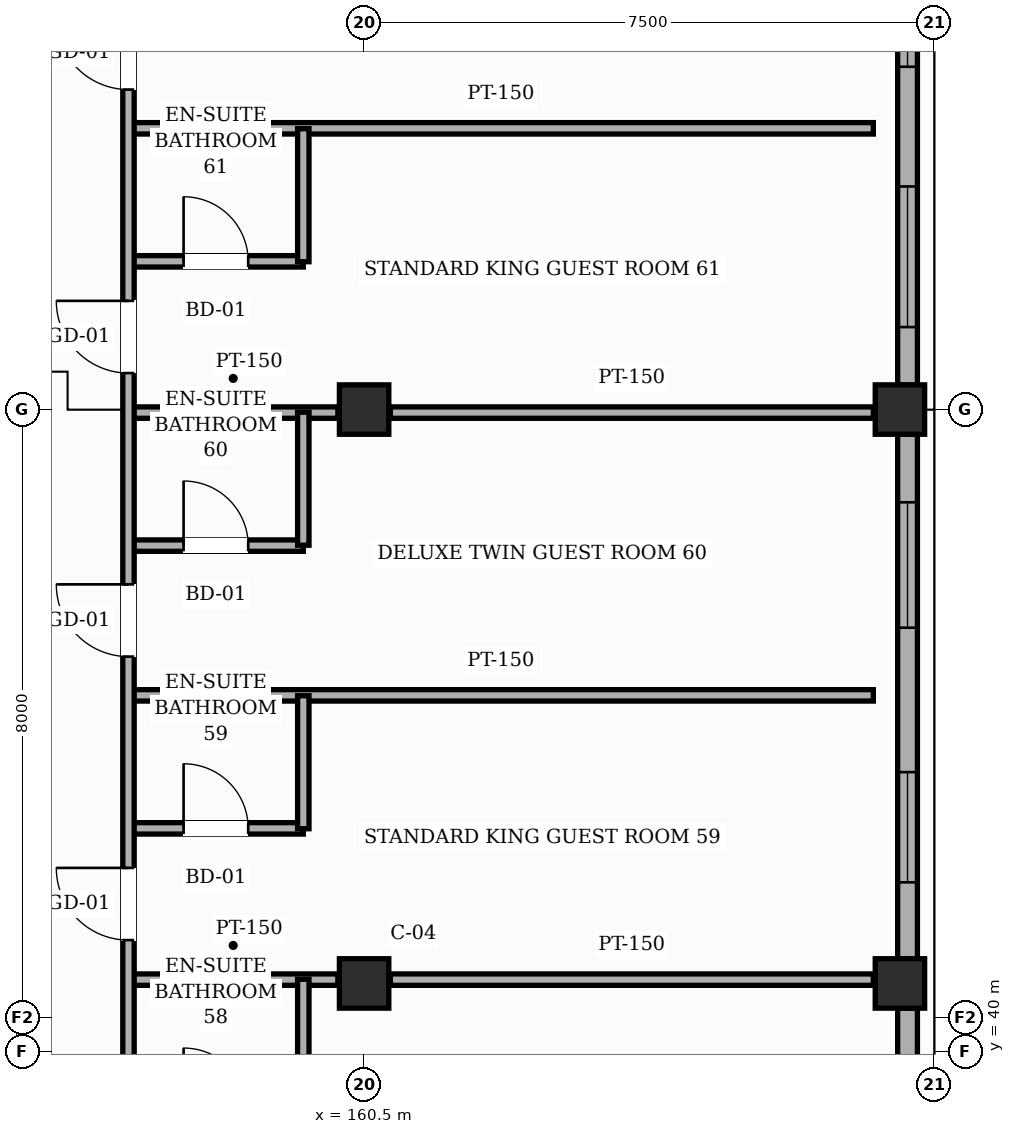
"""IFC4 building model, lengths in metres.
Left out: names, types, materials, properties, quantities, classifications, styles, units other than length and angle.
Written with IfcOpenShell. Run it as: python <this file> out.ifc"""

import sys

from ifc_helpers import new_model, si_unit, direction, frame, frame_2d, origin, origin_2d, place, context, subcontext, project, spatial, rectangle, hollow_rectangle, extrude, element, fill, save


model = new_model("IFC4")
c1 = context("Model", 3, precision=1e-05, world=origin(), true_north=direction((0.0, 1.0)))
c2 = subcontext(c1, "Body", "Model", "MODEL_VIEW")
j1 = project(units=[si_unit("LENGTHUNIT", "METRE"), si_unit("PLANEANGLEUNIT", "RADIAN")], contexts=[c1])
p1 = place(None, origin())
s1 = spatial("IfcSite", under=j1, at=p1, CompositionType="ELEMENT")
p2 = place(p1, origin())
s2 = spatial("IfcBuilding", under=s1, at=p2, CompositionType="ELEMENT")
p3 = place(p2, frame((0.0, 0.0, 19.8)))
s3 = spatial("IfcBuildingStorey", under=s2, at=p3, CompositionType="ELEMENT", Elevation=19.8)
for number, where, z_axis, x_axis in (
    (1, (160.5, 40.9, 0.0), (0.0, 0.0, 1.0), (1.0, 0.0, 0.0)),
    (2, (160.5, 48.45, 0.0), (0.0, 0.0, 1.0), (1.0, 0.0, 0.0)),
    (3, (167.55, 40.9, 0.0), (0.0, 0.0, 1.0), (1.0, 0.0, 0.0)),
    (4, (167.55, 48.45, 0.0), (0.0, 0.0, 1.0), (1.0, 0.0, 0.0)),
):
    element("IfcColumn", number, at=place(p3, frame(where, z_axis=z_axis, x_axis=x_axis)), inside=s3, PredefinedType="COLUMN", context=c2, shape_type="SweptSolid", body=[
        extrude(hollow_rectangle(XDim=0.65, YDim=0.65, WallThickness=0.025, InnerFilletRadius=0.025, OuterFilletRadius=0.05, at=origin_2d()), origin(), (0.0, 0.0, 1.0), 4.8),
    ])
p4 = place(p3, frame((167.65, 40.575, 0.0), z_axis=(0.0, 0.0, 1.0), x_axis=(0.0, -1.0, 0.0)))
e5 = element("IfcWall", 5, at=p4, inside=s3, PredefinedType="SOLIDWALL", context=c2, shape_type="SweptSolid", body=[
    extrude(rectangle(XDim=8.25, YDim=0.26, at=frame_2d((4.125, 0.0))), origin(), (0.0, 0.0, 1.0), 3.905),
])
p5 = place(p4, frame((4.095, 0.0, 0.85)))
e6 = element("IfcOpeningElement", 6, at=p5, cuts=e5, PredefinedType="OPENING", context=c2, shape_type="SweptSolid", body=[
    extrude(rectangle(XDim=2.25, YDim=1.8, at=frame_2d((1.125, 0.9))), frame((0.0, 0.14, 0.0), z_axis=(0.0, -1.0, 0.0), x_axis=(1.0, 0.0, 0.0)), (0.0, 0.0, 1.0), 0.28),
])
p6 = place(p4, frame((1.05, 0.0, 0.85)))
e7 = element("IfcOpeningElement", 7, at=p6, cuts=e5, PredefinedType="OPENING", context=c2, shape_type="SweptSolid", body=[
    extrude(rectangle(XDim=1.25, YDim=1.95, at=frame_2d((0.625, 0.975))), frame((0.0, 0.14, 0.0), z_axis=(0.0, -1.0, 0.0), x_axis=(1.0, 0.0, 0.0)), (0.0, 0.0, 1.0), 0.28),
])
p7 = place(p3, frame((167.65, 48.125, 0.0), z_axis=(0.0, 0.0, 1.0), x_axis=(0.0, -1.0, 0.0)))
e8 = element("IfcWall", 8, at=p7, inside=s3, PredefinedType="SOLIDWALL", context=c2, shape_type="SweptSolid", body=[
    extrude(rectangle(XDim=6.9, YDim=0.26, at=frame_2d((3.45, 0.0))), origin(), (0.0, 0.0, 1.0), 3.905),
])
p8 = place(p7, frame((4.445, 0.0, 0.85)))
e9 = element("IfcOpeningElement", 9, at=p8, cuts=e8, PredefinedType="OPENING", context=c2, shape_type="SweptSolid", body=[
    extrude(rectangle(XDim=1.45, YDim=1.95, at=frame_2d((0.725, 0.975))), frame((0.0, 0.14, 0.0), z_axis=(0.0, -1.0, 0.0), x_axis=(1.0, 0.0, 0.0)), (0.0, 0.0, 1.0), 0.28),
])
p9 = place(p7, frame((0.895, 0.0, 0.85)))
e10 = element("IfcOpeningElement", 10, at=p9, cuts=e8, PredefinedType="OPENING", context=c2, shape_type="SweptSolid", body=[
    extrude(rectangle(XDim=1.65, YDim=1.95, at=frame_2d((0.825, 0.975))), frame((0.0, 0.14, 0.0), z_axis=(0.0, -1.0, 0.0), x_axis=(1.0, 0.0, 0.0)), (0.0, 0.0, 1.0), 0.28),
])
p10 = place(p3, frame((167.65, 56.125, 0.0), z_axis=(0.0, 0.0, 1.0), x_axis=(0.0, -1.0, 0.0)))
e11 = element("IfcWall", 11, at=p10, inside=s3, PredefinedType="SOLIDWALL", context=c2, shape_type="SweptSolid", body=[
    extrude(rectangle(XDim=7.35, YDim=0.26, at=frame_2d((3.675, 0.0))), origin(), (0.0, 0.0, 1.0), 3.905),
])
p11 = place(p10, frame((4.74, 0.0, 0.85)))
e12 = element("IfcOpeningElement", 12, at=p11, cuts=e11, PredefinedType="OPENING", context=c2, shape_type="SweptSolid", body=[
    extrude(rectangle(XDim=1.85, YDim=1.95, at=frame_2d((0.925, 0.975))), frame((0.0, 0.14, 0.0), z_axis=(0.0, -1.0, 0.0), x_axis=(1.0, 0.0, 0.0)), (0.0, 0.0, 1.0), 0.28),
])
p12 = place(p10, frame((1.065, 0.0, 0.85)))
e13 = element("IfcOpeningElement", 13, at=p12, cuts=e11, PredefinedType="OPENING", context=c2, shape_type="SweptSolid", body=[
    extrude(rectangle(XDim=2.1, YDim=1.95, at=frame_2d((1.05, 0.975))), frame((0.0, 0.14, 0.0), z_axis=(0.0, -1.0, 0.0), x_axis=(1.0, 0.0, 0.0)), (0.0, 0.0, 1.0), 0.28),
])
p13 = place(p3, frame((157.4, 40.95, 0.0), z_axis=(0.0, 0.0, 1.0), x_axis=(1.0, 0.0, 0.0)))
e14 = element("IfcWall", 14, at=p13, inside=s3, PredefinedType="PARTITIONING", context=c2, shape_type="SweptSolid", body=[
    extrude(rectangle(XDim=2.755, YDim=0.15, at=frame_2d((1.377, 0.0))), origin(), (0.0, 0.0, 1.0), 3.905),
])
p14 = place(p3, frame((160.845, 40.95, 0.0), z_axis=(0.0, 0.0, 1.0), x_axis=(1.0, 0.0, 0.0)))
e15 = element("IfcWall", 15, at=p14, inside=s3, PredefinedType="PARTITIONING", context=c2, shape_type="SweptSolid", body=[
    extrude(rectangle(XDim=6.355, YDim=0.15, at=frame_2d((3.177, 0.0))), origin(), (0.0, 0.0, 1.0), 3.905),
])
p15 = place(p3, frame((157.4, 42.94, 0.0), z_axis=(0.0, 0.0, 1.0), x_axis=(1.0, 0.0, 0.0)))
e16 = element("IfcWall", 16, at=p15, inside=s3, PredefinedType="PARTITIONING", context=c2, shape_type="SweptSolid", body=[
    extrude(rectangle(XDim=2.3, YDim=0.15, at=frame_2d((1.15, 0.0))), origin(), (0.0, 0.0, 1.0), 4.565),
])
p16 = place(p15, frame((0.725, 0.0, 0.0)))
e17 = element("IfcOpeningElement", 17, at=p16, cuts=e16, PredefinedType="OPENING", context=c2, shape_type="SweptSolid", body=[
    extrude(rectangle(XDim=0.85, YDim=2.1, at=frame_2d((0.425, 1.05))), frame((0.0, 0.085, 0.0), z_axis=(0.0, -1.0, 0.0), x_axis=(1.0, 0.0, 0.0)), (0.0, 0.0, 1.0), 0.17),
])
p17 = place(p3, frame((157.4, 44.69, 0.0), z_axis=(0.0, 0.0, 1.0), x_axis=(1.0, 0.0, 0.0)))
e18 = element("IfcWall", 18, at=p17, inside=s3, PredefinedType="PARTITIONING", context=c2, shape_type="SweptSolid", body=[
    extrude(rectangle(XDim=9.8, YDim=0.15, at=frame_2d((4.9, 0.0))), origin(), (0.0, 0.0, 1.0), 4.255),
])
p18 = place(p3, frame((157.4, 46.66, 0.0), z_axis=(0.0, 0.0, 1.0), x_axis=(1.0, 0.0, 0.0)))
e19 = element("IfcWall", 19, at=p18, inside=s3, PredefinedType="PARTITIONING", context=c2, shape_type="SweptSolid", body=[
    extrude(rectangle(XDim=2.3, YDim=0.15, at=frame_2d((1.15, 0.0))), origin(), (0.0, 0.0, 1.0), 4.565),
])
p19 = place(p18, frame((0.725, 0.0, 0.0)))
e20 = element("IfcOpeningElement", 20, at=p19, cuts=e19, PredefinedType="OPENING", context=c2, shape_type="SweptSolid", body=[
    extrude(rectangle(XDim=0.85, YDim=2.1, at=frame_2d((0.425, 1.05))), frame((0.0, 0.085, 0.0), z_axis=(0.0, -1.0, 0.0), x_axis=(1.0, 0.0, 0.0)), (0.0, 0.0, 1.0), 0.17),
])
p20 = place(p3, frame((157.4, 48.41, 0.0), z_axis=(0.0, 0.0, 1.0), x_axis=(1.0, 0.0, 0.0)))
e21 = element("IfcWall", 21, at=p20, inside=s3, PredefinedType="PARTITIONING", context=c2, shape_type="SweptSolid", body=[
    extrude(rectangle(XDim=2.755, YDim=0.15, at=frame_2d((1.377, 0.0))), origin(), (0.0, 0.0, 1.0), 4.565),
])
p21 = place(p3, frame((160.845, 48.41, 0.0), z_axis=(0.0, 0.0, 1.0), x_axis=(1.0, 0.0, 0.0)))
e22 = element("IfcWall", 22, at=p21, inside=s3, PredefinedType="PARTITIONING", context=c2, shape_type="SweptSolid", body=[
    extrude(rectangle(XDim=6.355, YDim=0.15, at=frame_2d((3.177, 0.0))), origin(), (0.0, 0.0, 1.0), 3.955),
])
p22 = place(p3, frame((157.4, 50.4, 0.0), z_axis=(0.0, 0.0, 1.0), x_axis=(1.0, 0.0, 0.0)))
e23 = element("IfcWall", 23, at=p22, inside=s3, PredefinedType="PARTITIONING", context=c2, shape_type="SweptSolid", body=[
    extrude(rectangle(XDim=2.3, YDim=0.15, at=frame_2d((1.15, 0.0))), origin(), (0.0, 0.0, 1.0), 4.565),
])
p23 = place(p22, frame((0.725, 0.0, 0.0)))
e24 = element("IfcOpeningElement", 24, at=p23, cuts=e23, PredefinedType="OPENING", context=c2, shape_type="SweptSolid", body=[
    extrude(rectangle(XDim=0.85, YDim=2.1, at=frame_2d((0.425, 1.05))), frame((0.0, 0.085, 0.0), z_axis=(0.0, -1.0, 0.0), x_axis=(1.0, 0.0, 0.0)), (0.0, 0.0, 1.0), 0.17),
])
p24 = place(p3, frame((157.4, 52.15, 0.0), z_axis=(0.0, 0.0, 1.0), x_axis=(1.0, 0.0, 0.0)))
e25 = element("IfcWall", 25, at=p24, inside=s3, PredefinedType="PARTITIONING", context=c2, shape_type="SweptSolid", body=[
    extrude(rectangle(XDim=9.8, YDim=0.15, at=frame_2d((4.9, 0.0))), origin(), (0.0, 0.0, 1.0), 4.565),
])
p25 = place(p3, frame((157.4, 22.3, 0.0), z_axis=(0.0, 0.0, 1.0), x_axis=(0.0, 1.0, 0.0)))
e26 = element("IfcWall", 26, at=p25, inside=s3, PredefinedType="PARTITIONING", context=c2, shape_type="SweptSolid", body=[
    extrude(rectangle(XDim=48.5, YDim=0.15, at=frame_2d((24.25, 0.0))), origin(), (0.0, 0.0, 1.0), 4.565),
])
p26 = place(p25, frame((0.515, 0.0, 0.0)))
e27 = element("IfcOpeningElement", 27, at=p26, cuts=e26, PredefinedType="OPENING", context=c2, shape_type="SweptSolid", body=[
    extrude(rectangle(XDim=0.95, YDim=2.15, at=frame_2d((0.475, 1.075))), frame((0.0, 0.085, 0.0), z_axis=(0.0, -1.0, 0.0), x_axis=(1.0, 0.0, 0.0)), (0.0, 0.0, 1.0), 0.17),
])
p27 = place(p25, frame((4.245, 0.0, 0.0)))
e28 = element("IfcOpeningElement", 28, at=p27, cuts=e26, PredefinedType="OPENING", context=c2, shape_type="SweptSolid", body=[
    extrude(rectangle(XDim=0.95, YDim=2.15, at=frame_2d((0.475, 1.075))), frame((0.0, 0.085, 0.0), z_axis=(0.0, -1.0, 0.0), x_axis=(1.0, 0.0, 0.0)), (0.0, 0.0, 1.0), 0.17),
])
p28 = place(p25, frame((7.975, 0.0, 0.0)))
e29 = element("IfcOpeningElement", 29, at=p28, cuts=e26, PredefinedType="OPENING", context=c2, shape_type="SweptSolid", body=[
    extrude(rectangle(XDim=0.95, YDim=2.15, at=frame_2d((0.475, 1.075))), frame((0.0, 0.085, 0.0), z_axis=(0.0, -1.0, 0.0), x_axis=(1.0, 0.0, 0.0)), (0.0, 0.0, 1.0), 0.17),
])
p29 = place(p25, frame((11.71, 0.0, 0.0)))
e30 = element("IfcOpeningElement", 30, at=p29, cuts=e26, PredefinedType="OPENING", context=c2, shape_type="SweptSolid", body=[
    extrude(rectangle(XDim=0.95, YDim=2.15, at=frame_2d((0.475, 1.075))), frame((0.0, 0.085, 0.0), z_axis=(0.0, -1.0, 0.0), x_axis=(1.0, 0.0, 0.0)), (0.0, 0.0, 1.0), 0.17),
])
p30 = place(p25, frame((15.44, 0.0, 0.0)))
e31 = element("IfcOpeningElement", 31, at=p30, cuts=e26, PredefinedType="OPENING", context=c2, shape_type="SweptSolid", body=[
    extrude(rectangle(XDim=0.95, YDim=2.15, at=frame_2d((0.475, 1.075))), frame((0.0, 0.085, 0.0), z_axis=(0.0, -1.0, 0.0), x_axis=(1.0, 0.0, 0.0)), (0.0, 0.0, 1.0), 0.17),
])
p31 = place(p25, frame((19.17, 0.0, 0.0)))
e32 = element("IfcOpeningElement", 32, at=p31, cuts=e26, PredefinedType="OPENING", context=c2, shape_type="SweptSolid", body=[
    extrude(rectangle(XDim=0.95, YDim=2.15, at=frame_2d((0.475, 1.075))), frame((0.0, 0.085, 0.0), z_axis=(0.0, -1.0, 0.0), x_axis=(1.0, 0.0, 0.0)), (0.0, 0.0, 1.0), 0.17),
])
p32 = place(p25, frame((22.9, 0.0, 0.0)))
e33 = element("IfcOpeningElement", 33, at=p32, cuts=e26, PredefinedType="OPENING", context=c2, shape_type="SweptSolid", body=[
    extrude(rectangle(XDim=0.95, YDim=2.15, at=frame_2d((0.475, 1.075))), frame((0.0, 0.085, 0.0), z_axis=(0.0, -1.0, 0.0), x_axis=(1.0, 0.0, 0.0)), (0.0, 0.0, 1.0), 0.17),
])
p33 = place(p25, frame((26.63, 0.0, 0.0)))
e34 = element("IfcOpeningElement", 34, at=p33, cuts=e26, PredefinedType="OPENING", context=c2, shape_type="SweptSolid", body=[
    extrude(rectangle(XDim=0.95, YDim=2.15, at=frame_2d((0.475, 1.075))), frame((0.0, 0.085, 0.0), z_axis=(0.0, -1.0, 0.0), x_axis=(1.0, 0.0, 0.0)), (0.0, 0.0, 1.0), 0.17),
])
p34 = place(p25, frame((30.36, 0.0, 0.0)))
e35 = element("IfcOpeningElement", 35, at=p34, cuts=e26, PredefinedType="OPENING", context=c2, shape_type="SweptSolid", body=[
    extrude(rectangle(XDim=0.95, YDim=2.15, at=frame_2d((0.475, 1.075))), frame((0.0, 0.085, 0.0), z_axis=(0.0, -1.0, 0.0), x_axis=(1.0, 0.0, 0.0)), (0.0, 0.0, 1.0), 0.17),
])
p35 = place(p25, frame((34.09, 0.0, 0.0)))
e36 = element("IfcOpeningElement", 36, at=p35, cuts=e26, PredefinedType="OPENING", context=c2, shape_type="SweptSolid", body=[
    extrude(rectangle(XDim=0.95, YDim=2.15, at=frame_2d((0.475, 1.075))), frame((0.0, 0.085, 0.0), z_axis=(0.0, -1.0, 0.0), x_axis=(1.0, 0.0, 0.0)), (0.0, 0.0, 1.0), 0.17),
])
p36 = place(p25, frame((37.825, 0.0, 0.0)))
e37 = element("IfcOpeningElement", 37, at=p36, cuts=e26, PredefinedType="OPENING", context=c2, shape_type="SweptSolid", body=[
    extrude(rectangle(XDim=0.95, YDim=2.15, at=frame_2d((0.475, 1.075))), frame((0.0, 0.085, 0.0), z_axis=(0.0, -1.0, 0.0), x_axis=(1.0, 0.0, 0.0)), (0.0, 0.0, 1.0), 0.17),
])
p37 = place(p25, frame((41.555, 0.0, 0.0)))
e38 = element("IfcOpeningElement", 38, at=p37, cuts=e26, PredefinedType="OPENING", context=c2, shape_type="SweptSolid", body=[
    extrude(rectangle(XDim=0.95, YDim=2.15, at=frame_2d((0.475, 1.075))), frame((0.0, 0.085, 0.0), z_axis=(0.0, -1.0, 0.0), x_axis=(1.0, 0.0, 0.0)), (0.0, 0.0, 1.0), 0.17),
])
p38 = place(p25, frame((45.285, 0.0, 0.0)))
e39 = element("IfcOpeningElement", 39, at=p38, cuts=e26, PredefinedType="OPENING", context=c2, shape_type="SweptSolid", body=[
    extrude(rectangle(XDim=0.95, YDim=2.15, at=frame_2d((0.475, 1.075))), frame((0.0, 0.085, 0.0), z_axis=(0.0, -1.0, 0.0), x_axis=(1.0, 0.0, 0.0)), (0.0, 0.0, 1.0), 0.17),
])
for number, where, z_axis, x_axis in (
    (40, (159.7, 39.205, 0.0), (0.0, 0.0, 1.0), (0.0, 1.0, 0.0)),
    (41, (159.7, 42.935, 0.0), (0.0, 0.0, 1.0), (0.0, 1.0, 0.0)),
    (42, (159.7, 46.665, 0.0), (0.0, 0.0, 1.0), (0.0, 1.0, 0.0)),
    (43, (159.7, 50.395, 0.0), (0.0, 0.0, 1.0), (0.0, 1.0, 0.0)),
):
    element("IfcWall", number, at=place(p3, frame(where, z_axis=z_axis, x_axis=x_axis)), inside=s3, PredefinedType="PARTITIONING", context=c2, shape_type="SweptSolid", body=[
        extrude(rectangle(XDim=1.75, YDim=0.15, at=frame_2d((0.875, 0.0))), origin(), (0.0, 0.0, 1.0), 4.565),
    ])
p39 = place(p8, origin())
e44 = element("IfcWindow", 44, at=p39, inside=s3, PartitioningType="SINGLE_PANEL", PredefinedType="WINDOW", context=c2, shape_type="SweptSolid", body=[
    extrude(rectangle(XDim=1.45, YDim=1.95, at=frame_2d((0.725, 0.975))), frame((0.0, 0.03, 0.0), z_axis=(0.0, -1.0, 0.0), x_axis=(1.0, 0.0, 0.0)), (0.0, 0.0, 1.0), 0.06),
])
fill(e9, e44)
p40 = place(p9, origin())
e45 = element("IfcWindow", 45, at=p40, inside=s3, PartitioningType="SINGLE_PANEL", PredefinedType="WINDOW", context=c2, shape_type="SweptSolid", body=[
    extrude(rectangle(XDim=1.65, YDim=1.95, at=frame_2d((0.825, 0.975))), frame((0.0, 0.03, 0.0), z_axis=(0.0, -1.0, 0.0), x_axis=(1.0, 0.0, 0.0)), (0.0, 0.0, 1.0), 0.06),
])
fill(e10, e45)
p41 = place(p11, origin())
e46 = element("IfcWindow", 46, at=p41, inside=s3, PartitioningType="SINGLE_PANEL", PredefinedType="WINDOW", context=c2, shape_type="SweptSolid", body=[
    extrude(rectangle(XDim=1.85, YDim=1.95, at=frame_2d((0.925, 0.975))), frame((0.0, 0.03, 0.0), z_axis=(0.0, -1.0, 0.0), x_axis=(1.0, 0.0, 0.0)), (0.0, 0.0, 1.0), 0.06),
])
fill(e12, e46)
p42 = place(p12, origin())
e47 = element("IfcWindow", 47, at=p42, inside=s3, PartitioningType="SINGLE_PANEL", PredefinedType="WINDOW", context=c2, shape_type="SweptSolid", body=[
    extrude(rectangle(XDim=2.1, YDim=1.95, at=frame_2d((1.05, 0.975))), frame((0.0, 0.03, 0.0), z_axis=(0.0, -1.0, 0.0), x_axis=(1.0, 0.0, 0.0)), (0.0, 0.0, 1.0), 0.06),
])
fill(e13, e47)
p43 = place(p31, origin())
e48 = element("IfcDoor", 48, at=p43, inside=s3, OperationType="SINGLE_SWING_RIGHT", PredefinedType="DOOR", context=c2, shape_type="SweptSolid", body=[
    extrude(rectangle(XDim=0.95, YDim=2.15, at=frame_2d((0.475, 1.075))), frame((0.0, 0.025, 0.0), z_axis=(0.0, -1.0, 0.0), x_axis=(1.0, 0.0, 0.0)), (0.0, 0.0, 1.0), 0.05),
])
fill(e32, e48)
p44 = place(p16, origin())
e49 = element("IfcDoor", 49, at=p44, inside=s3, OperationType="SINGLE_SWING_LEFT", PredefinedType="DOOR", context=c2, shape_type="SweptSolid", body=[
    extrude(rectangle(XDim=0.85, YDim=2.1, at=frame_2d((0.425, 1.05))), frame((0.0, 0.025, 0.0), z_axis=(0.0, -1.0, 0.0), x_axis=(1.0, 0.0, 0.0)), (0.0, 0.0, 1.0), 0.05),
])
fill(e17, e49)
p45 = place(p32, origin())
e50 = element("IfcDoor", 50, at=p45, inside=s3, OperationType="SINGLE_SWING_RIGHT", PredefinedType="DOOR", context=c2, shape_type="SweptSolid", body=[
    extrude(rectangle(XDim=0.95, YDim=2.15, at=frame_2d((0.475, 1.075))), frame((0.0, 0.025, 0.0), z_axis=(0.0, -1.0, 0.0), x_axis=(1.0, 0.0, 0.0)), (0.0, 0.0, 1.0), 0.05),
])
fill(e33, e50)
p46 = place(p19, origin())
e51 = element("IfcDoor", 51, at=p46, inside=s3, OperationType="SINGLE_SWING_LEFT", PredefinedType="DOOR", context=c2, shape_type="SweptSolid", body=[
    extrude(rectangle(XDim=0.85, YDim=2.1, at=frame_2d((0.425, 1.05))), frame((0.0, 0.025, 0.0), z_axis=(0.0, -1.0, 0.0), x_axis=(1.0, 0.0, 0.0)), (0.0, 0.0, 1.0), 0.05),
])
fill(e20, e51)
p47 = place(p33, origin())
e52 = element("IfcDoor", 52, at=p47, inside=s3, OperationType="SINGLE_SWING_RIGHT", PredefinedType="DOOR", context=c2, shape_type="SweptSolid", body=[
    extrude(rectangle(XDim=0.95, YDim=2.15, at=frame_2d((0.475, 1.075))), frame((0.0, 0.025, 0.0), z_axis=(0.0, -1.0, 0.0), x_axis=(1.0, 0.0, 0.0)), (0.0, 0.0, 1.0), 0.05),
])
fill(e34, e52)
p48 = place(p23, origin())
e53 = element("IfcDoor", 53, at=p48, inside=s3, OperationType="SINGLE_SWING_LEFT", PredefinedType="DOOR", context=c2, shape_type="SweptSolid", body=[
    extrude(rectangle(XDim=0.85, YDim=2.1, at=frame_2d((0.425, 1.05))), frame((0.0, 0.025, 0.0), z_axis=(0.0, -1.0, 0.0), x_axis=(1.0, 0.0, 0.0)), (0.0, 0.0, 1.0), 0.05),
])
fill(e24, e53)
p49 = place(p34, origin())
e54 = element("IfcDoor", 54, at=p49, inside=s3, OperationType="SINGLE_SWING_RIGHT", PredefinedType="DOOR", context=c2, shape_type="SweptSolid", body=[
    extrude(rectangle(XDim=0.95, YDim=2.15, at=frame_2d((0.475, 1.075))), frame((0.0, 0.025, 0.0), z_axis=(0.0, -1.0, 0.0), x_axis=(1.0, 0.0, 0.0)), (0.0, 0.0, 1.0), 0.05),
])
fill(e35, e54)
save(model, sys.argv[1])
